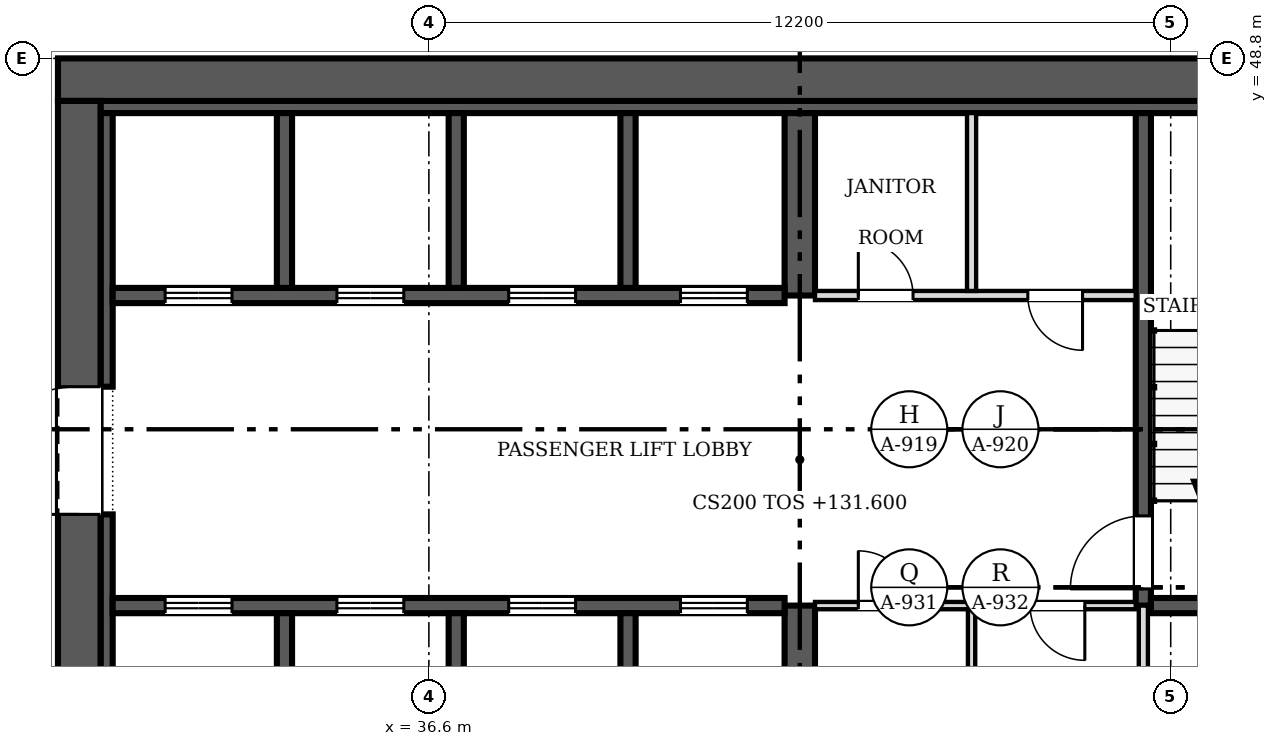
"""IFC4 building model, lengths in metres.
Left out: names, types, materials, properties, quantities, classifications, styles, units other than length and angle.
Written with IfcOpenShell. Run it as: python <this file> out.ifc"""

import sys

from ifc_helpers import new_model, si_unit, direction, frame, frame_2d, origin, place, context, subcontext, project, spatial, rectangle, extrude, source, transform, mapped, element, fill, save


model = new_model("IFC4")
c1 = context("Model", 3, precision=1e-05, world=origin(), true_north=direction((0.0, 1.0)))
c2 = subcontext(c1, "Body", "Model", "MODEL_VIEW")
j1 = project(units=[si_unit("LENGTHUNIT", "METRE"), si_unit("PLANEANGLEUNIT", "RADIAN")], contexts=[c1])
p1 = place(None, origin())
s1 = spatial("IfcSite", under=j1, at=p1, CompositionType="ELEMENT")
p2 = place(p1, origin())
s2 = spatial("IfcBuilding", under=s1, at=p2, CompositionType="ELEMENT")
p3 = place(p2, frame((0.0, 0.0, 131.6)))
s3 = spatial("IfcBuildingStorey", under=s2, at=p3, CompositionType="ELEMENT", Elevation=131.6)
p4 = place(p3, frame((30.85, 25.1, 0.0), z_axis=(0.0, 0.0, 1.0), x_axis=(0.0, 1.0, 0.0)))
e1 = element("IfcWall", 1, at=p4, inside=s3, PredefinedType="SHEAR", context=c2, shape_type="SweptSolid", body=[
    extrude(rectangle(XDim=23.0, YDim=0.7, at=frame_2d((11.5, 0.0))), origin(), (0.0, 0.0, 1.0), 3.8),
])
m1 = source(origin(), c2, "Body", "SweptSolid", [
    extrude(rectangle(XDim=2.1, YDim=2.4, at=frame_2d((1.05, 1.2))), frame((0.0, 0.36, 0.0), z_axis=(0.0, -1.0, 0.0), x_axis=(1.0, 0.0, 0.0)), (0.0, 0.0, 1.0), 0.72),
])
p5 = place(p4, frame((4.7, 0.0, 0.0)))
e2 = element("IfcOpeningElement", 2, at=p5, cuts=e1, PredefinedType="OPENING", context=c2, shape_type="MappedRepresentation", body=[
    mapped(m1, transform((0.0, 0.0, 0.0), scale=1.0)),
])
p6 = place(p4, frame((16.2, 0.0, 0.0)))
e3 = element("IfcOpeningElement", 3, at=p6, cuts=e1, PredefinedType="OPENING", context=c2, shape_type="MappedRepresentation", body=[
    mapped(m1, transform((0.0, 0.0, 0.0), scale=1.0)),
])
p7 = place(p3, frame((30.5, 48.45, 0.0), z_axis=(0.0, 0.0, 1.0), x_axis=(1.0, 0.0, 0.0)))
e4 = element("IfcWall", 4, at=p7, inside=s3, PredefinedType="SHEAR", context=c2, shape_type="SweptSolid", body=[
    extrude(rectangle(XDim=24.4, YDim=0.7, at=frame_2d((12.2, 0.0))), origin(), (0.0, 0.0, 1.0), 3.8),
])
p8 = place(p3, frame((31.2, 48.0, 0.0), z_axis=(0.0, 0.0, 1.0), x_axis=(1.0, 0.0, 0.0)))
e5 = element("IfcWall", 5, at=p8, inside=s3, PredefinedType="SOLIDWALL", context=c2, shape_type="SweptSolid", body=[
    extrude(rectangle(XDim=23.0, YDim=0.2, at=frame_2d((11.5, 0.0))), origin(), (0.0, 0.0, 1.0), 3.8),
])
p9 = place(p3, frame((31.3, 31.9, 0.0), z_axis=(0.0, 0.0, 1.0), x_axis=(0.0, 1.0, 0.0)))
e6 = element("IfcWall", 6, at=p9, inside=s3, PredefinedType="SOLIDWALL", context=c2, shape_type="SweptSolid", body=[
    extrude(rectangle(XDim=9.4, YDim=0.2, at=frame_2d((4.7, 0.0))), origin(), (0.0, 0.0, 1.0), 3.8),
])
p10 = place(p3, frame((31.3, 43.4, 0.0), z_axis=(0.0, 0.0, 1.0), x_axis=(0.0, 1.0, 0.0)))
e7 = element("IfcWall", 7, at=p10, inside=s3, PredefinedType="SOLIDWALL", context=c2, shape_type="SweptSolid", body=[
    extrude(rectangle(XDim=4.5, YDim=0.2, at=frame_2d((2.25, 0.0))), origin(), (0.0, 0.0, 1.0), 3.8),
])
p11 = place(p3, frame((42.7, 36.85, 0.0), z_axis=(0.0, 0.0, 1.0), x_axis=(0.0, 1.0, 0.0)))
e8 = element("IfcWall", 8, at=p11, inside=s3, PredefinedType="SHEAR", context=c2, shape_type="SweptSolid", body=[
    extrude(rectangle(XDim=2.95, YDim=0.5, at=frame_2d((1.475, 0.0))), origin(), (0.0, 0.0, 1.0), 3.8),
])
p12 = place(p3, frame((42.7, 44.9, 0.0), z_axis=(0.0, 0.0, 1.0), x_axis=(0.0, 1.0, 0.0)))
e9 = element("IfcWall", 9, at=p12, inside=s3, PredefinedType="SHEAR", context=c2, shape_type="SweptSolid", body=[
    extrude(rectangle(XDim=3.0, YDim=0.5, at=frame_2d((1.5, 0.0))), origin(), (0.0, 0.0, 1.0), 3.8),
])
p13 = place(p3, frame((31.4, 39.8, 0.0), z_axis=(0.0, 0.0, 1.0), x_axis=(1.0, 0.0, 0.0)))
e10 = element("IfcWall", 10, at=p13, inside=s3, PredefinedType="SOLIDWALL", context=c2, shape_type="SweptSolid", body=[
    extrude(rectangle(XDim=11.05, YDim=0.25, at=frame_2d((5.525, 0.0))), origin(), (0.0, 0.0, 1.0), 3.8),
])
m2 = source(origin(), c2, "Body", "SweptSolid", [
    extrude(rectangle(XDim=1.1, YDim=2.1, at=frame_2d((0.55, 1.05))), frame((0.0, 0.135, 0.0), z_axis=(0.0, -1.0, 0.0), x_axis=(1.0, 0.0, 0.0)), (0.0, 0.0, 1.0), 0.27),
])
p14 = place(p13, frame((0.863, 0.0, 0.0)))
e11 = element("IfcOpeningElement", 11, at=p14, cuts=e10, PredefinedType="OPENING", context=c2, shape_type="MappedRepresentation", body=[
    mapped(m2, transform((0.0, 0.0, 0.0), scale=1.0)),
])
p15 = place(p13, frame((3.688, 0.0, 0.0)))
e12 = element("IfcOpeningElement", 12, at=p15, cuts=e10, PredefinedType="OPENING", context=c2, shape_type="MappedRepresentation", body=[
    mapped(m2, transform((0.0, 0.0, 0.0), scale=1.0)),
])
p16 = place(p13, frame((6.512, 0.0, 0.0)))
e13 = element("IfcOpeningElement", 13, at=p16, cuts=e10, PredefinedType="OPENING", context=c2, shape_type="MappedRepresentation", body=[
    mapped(m2, transform((0.0, 0.0, 0.0), scale=1.0)),
])
p17 = place(p13, frame((9.337, 0.0, 0.0)))
e14 = element("IfcOpeningElement", 14, at=p17, cuts=e10, PredefinedType="OPENING", context=c2, shape_type="MappedRepresentation", body=[
    mapped(m2, transform((0.0, 0.0, 0.0), scale=1.0)),
])
p18 = place(p3, frame((42.45, 44.9, 0.0), z_axis=(0.0, 0.0, 1.0), x_axis=(-1.0, 0.0, 0.0)))
e15 = element("IfcWall", 15, at=p18, inside=s3, PredefinedType="SOLIDWALL", context=c2, shape_type="SweptSolid", body=[
    extrude(rectangle(XDim=11.05, YDim=0.25, at=frame_2d((5.525, 0.0))), origin(), (0.0, 0.0, 1.0), 3.8),
])
p19 = place(p18, frame((9.087, 0.0, 0.0)))
e16 = element("IfcOpeningElement", 16, at=p19, cuts=e15, PredefinedType="OPENING", context=c2, shape_type="MappedRepresentation", body=[
    mapped(m2, transform((0.0, 0.0, 0.0), scale=1.0)),
])
p20 = place(p18, frame((6.262, 0.0, 0.0)))
e17 = element("IfcOpeningElement", 17, at=p20, cuts=e15, PredefinedType="OPENING", context=c2, shape_type="MappedRepresentation", body=[
    mapped(m2, transform((0.0, 0.0, 0.0), scale=1.0)),
])
p21 = place(p18, frame((3.438, 0.0, 0.0)))
e18 = element("IfcOpeningElement", 18, at=p21, cuts=e15, PredefinedType="OPENING", context=c2, shape_type="MappedRepresentation", body=[
    mapped(m2, transform((0.0, 0.0, 0.0), scale=1.0)),
])
p22 = place(p18, frame((0.613, 0.0, 0.0)))
e19 = element("IfcOpeningElement", 19, at=p22, cuts=e15, PredefinedType="OPENING", context=c2, shape_type="MappedRepresentation", body=[
    mapped(m2, transform((0.0, 0.0, 0.0), scale=1.0)),
])
p23 = place(p3, frame((48.35, 47.9, 0.0), z_axis=(0.0, 0.0, 1.0), x_axis=(0.0, -1.0, 0.0)))
e20 = element("IfcWall", 20, at=p23, inside=s3, PredefinedType="SOLIDWALL", context=c2, shape_type="SweptSolid", body=[
    extrude(rectangle(XDim=8.1, YDim=0.25, at=frame_2d((4.05, 0.0))), origin(), (0.0, 0.0, 1.0), 3.8),
])
m3 = source(origin(), c2, "Body", "SweptSolid", [
    extrude(rectangle(XDim=1.2, YDim=2.1, at=frame_2d((0.6, 1.05))), frame((0.0, 0.135, 0.0), z_axis=(0.0, -1.0, 0.0), x_axis=(1.0, 0.0, 0.0)), (0.0, 0.0, 1.0), 0.27),
])
p24 = place(p23, frame((6.625, 0.0, 0.0)))
e21 = element("IfcOpeningElement", 21, at=p24, cuts=e20, PredefinedType="OPENING", context=c2, shape_type="MappedRepresentation", body=[
    mapped(m3, transform((0.0, 0.0, 0.0), scale=1.0)),
])
p25 = place(p3, frame((48.475, 39.8, 0.0), z_axis=(0.0, 0.0, 1.0), x_axis=(1.0, 0.0, 0.0)))
e22 = element("IfcWall", 22, at=p25, inside=s3, PredefinedType="SOLIDWALL", context=c2, shape_type="SweptSolid", body=[
    extrude(rectangle(XDim=3.4, YDim=0.25, at=frame_2d((1.7, 0.0))), origin(), (0.0, 0.0, 1.0), 3.8),
])
for number, where, z_axis, x_axis in (
    (23, (34.225, 36.85, 0.0), (0.0, 0.0, 1.0), (0.0, 1.0, 0.0)),
    (24, (37.05, 36.85, 0.0), (0.0, 0.0, 1.0), (0.0, 1.0, 0.0)),
    (25, (39.875, 36.85, 0.0), (0.0, 0.0, 1.0), (0.0, 1.0, 0.0)),
):
    element("IfcWall", number, at=place(p3, frame(where, z_axis=z_axis, x_axis=x_axis)), inside=s3, PredefinedType="SOLIDWALL", context=c2, shape_type="SweptSolid", body=[
        extrude(rectangle(XDim=2.825, YDim=0.25, at=frame_2d((1.413, 0.0))), origin(), (0.0, 0.0, 1.0), 3.8),
    ])
for number, where, z_axis, x_axis in (
    (26, (34.225, 45.025, 0.0), (0.0, 0.0, 1.0), (0.0, 1.0, 0.0)),
    (27, (37.05, 45.025, 0.0), (0.0, 0.0, 1.0), (0.0, 1.0, 0.0)),
    (28, (39.875, 45.025, 0.0), (0.0, 0.0, 1.0), (0.0, 1.0, 0.0)),
):
    element("IfcWall", number, at=place(p3, frame(where, z_axis=z_axis, x_axis=x_axis)), inside=s3, PredefinedType="SOLIDWALL", context=c2, shape_type="SweptSolid", body=[
        extrude(rectangle(XDim=2.875, YDim=0.25, at=frame_2d((1.438, 0.0))), origin(), (0.0, 0.0, 1.0), 3.8),
    ])
p26 = place(p3, frame((48.225, 39.8, 0.0), z_axis=(0.0, 0.0, 1.0), x_axis=(-1.0, 0.0, 0.0)))
e29 = element("IfcWall", 29, at=p26, inside=s3, PredefinedType="PARTITIONING", context=c2, shape_type="SweptSolid", body=[
    extrude(rectangle(XDim=5.275, YDim=0.12, at=frame_2d((2.638, 0.0))), origin(), (0.0, 0.0, 1.0), 3.6),
])
m4 = source(origin(), c2, "Body", "SweptSolid", [
    extrude(rectangle(XDim=0.9, YDim=2.1, at=frame_2d((0.45, 1.05))), frame((0.0, 0.07, 0.0), z_axis=(0.0, -1.0, 0.0), x_axis=(1.0, 0.0, 0.0)), (0.0, 0.0, 1.0), 0.14),
])
p27 = place(p26, frame((3.663, 0.0, 0.0)))
e30 = element("IfcOpeningElement", 30, at=p27, cuts=e29, PredefinedType="OPENING", context=c2, shape_type="MappedRepresentation", body=[
    mapped(m4, transform((0.0, 0.0, 0.0), scale=1.0)),
])
p28 = place(p26, frame((0.837, 0.0, 0.0)))
e31 = element("IfcOpeningElement", 31, at=p28, cuts=e29, PredefinedType="OPENING", context=c2, shape_type="MappedRepresentation", body=[
    mapped(m4, transform((0.0, 0.0, 0.0), scale=1.0)),
])
p29 = place(p3, frame((42.95, 44.9, 0.0), z_axis=(0.0, 0.0, 1.0), x_axis=(1.0, 0.0, 0.0)))
e32 = element("IfcWall", 32, at=p29, inside=s3, PredefinedType="PARTITIONING", context=c2, shape_type="SweptSolid", body=[
    extrude(rectangle(XDim=5.275, YDim=0.15, at=frame_2d((2.638, 0.0))), origin(), (0.0, 0.0, 1.0), 3.6),
])
m5 = source(origin(), c2, "Body", "SweptSolid", [
    extrude(rectangle(XDim=0.9, YDim=2.1, at=frame_2d((0.45, 1.05))), frame((0.0, 0.085, 0.0), z_axis=(0.0, -1.0, 0.0), x_axis=(1.0, 0.0, 0.0)), (0.0, 0.0, 1.0), 0.17),
])
p30 = place(p29, frame((0.712, 0.0, 0.0)))
e33 = element("IfcOpeningElement", 33, at=p30, cuts=e32, PredefinedType="OPENING", context=c2, shape_type="MappedRepresentation", body=[
    mapped(m5, transform((0.0, 0.0, 0.0), scale=1.0)),
])
p31 = place(p29, frame((3.5, 0.0, 0.0)))
e34 = element("IfcOpeningElement", 34, at=p31, cuts=e32, PredefinedType="OPENING", context=c2, shape_type="MappedRepresentation", body=[
    mapped(m5, transform((0.0, 0.0, 0.0), scale=1.0)),
])
p32 = place(p3, frame((45.525, 36.85, 0.0), z_axis=(0.0, 0.0, 1.0), x_axis=(0.0, 1.0, 0.0)))
e35 = element("IfcWall", 35, at=p32, inside=s3, PredefinedType="PARTITIONING", context=c2, shape_type="SweptSolid", body=[
    extrude(rectangle(XDim=2.89, YDim=0.12, at=frame_2d((1.445, 0.0))), origin(), (0.0, 0.0, 1.0), 3.6),
])
p33 = place(p3, frame((48.35, 36.85, 0.0), z_axis=(0.0, 0.0, 1.0), x_axis=(0.0, 1.0, 0.0)))
e36 = element("IfcWall", 36, at=p33, inside=s3, PredefinedType="PARTITIONING", context=c2, shape_type="SweptSolid", body=[
    extrude(rectangle(XDim=2.95, YDim=0.15, at=frame_2d((1.475, 0.0))), origin(), (0.0, 0.0, 1.0), 3.6),
])
p34 = place(p3, frame((45.525, 44.975, 0.0), z_axis=(0.0, 0.0, 1.0), x_axis=(0.0, 1.0, 0.0)))
e37 = element("IfcWall", 37, at=p34, inside=s3, PredefinedType="PARTITIONING", context=c2, shape_type="SweptSolid", body=[
    extrude(rectangle(XDim=2.925, YDim=0.15, at=frame_2d((1.462, 0.0))), origin(), (0.0, 0.0, 1.0), 3.6),
])
m6 = source(origin(), c2, "Body", "SweptSolid", [
    extrude(rectangle(XDim=2.1, YDim=2.4, at=frame_2d((1.05, 1.2))), frame((0.0, 0.025, 0.0), z_axis=(0.0, -1.0, 0.0), x_axis=(1.0, 0.0, 0.0)), (0.0, 0.0, 1.0), 0.05),
])
p35 = place(p6, origin())
e38 = element("IfcDoor", 38, at=p35, inside=s3, OperationType="DOUBLE_DOOR_SINGLE_SWING", PredefinedType="DOOR", context=c2, shape_type="MappedRepresentation", body=[
    mapped(m6, transform((0.0, 0.0, 0.0), scale=1.0)),
])
fill(e3, e38)
m7 = source(origin(), c2, "Body", "SweptSolid", [
    extrude(rectangle(XDim=1.1, YDim=2.1, at=frame_2d((0.55, 1.05))), frame((0.0, 0.025, 0.0), z_axis=(0.0, -1.0, 0.0), x_axis=(1.0, 0.0, 0.0)), (0.0, 0.0, 1.0), 0.05),
])
p36 = place(p14, origin())
e39 = element("IfcDoor", 39, at=p36, inside=s3, OperationType="DOUBLE_DOOR_SLIDING", PredefinedType="DOOR", context=c2, shape_type="MappedRepresentation", body=[
    mapped(m7, transform((0.0, 0.0, 0.0), scale=1.0)),
])
fill(e11, e39)
p37 = place(p15, origin())
e40 = element("IfcDoor", 40, at=p37, inside=s3, OperationType="DOUBLE_DOOR_SLIDING", PredefinedType="DOOR", context=c2, shape_type="MappedRepresentation", body=[
    mapped(m7, transform((0.0, 0.0, 0.0), scale=1.0)),
])
fill(e12, e40)
p38 = place(p16, origin())
e41 = element("IfcDoor", 41, at=p38, inside=s3, OperationType="DOUBLE_DOOR_SLIDING", PredefinedType="DOOR", context=c2, shape_type="MappedRepresentation", body=[
    mapped(m7, transform((0.0, 0.0, 0.0), scale=1.0)),
])
fill(e13, e41)
p39 = place(p17, origin())
e42 = element("IfcDoor", 42, at=p39, inside=s3, OperationType="DOUBLE_DOOR_SLIDING", PredefinedType="DOOR", context=c2, shape_type="MappedRepresentation", body=[
    mapped(m7, transform((0.0, 0.0, 0.0), scale=1.0)),
])
fill(e14, e42)
p40 = place(p19, origin())
e43 = element("IfcDoor", 43, at=p40, inside=s3, OperationType="DOUBLE_DOOR_SLIDING", PredefinedType="DOOR", context=c2, shape_type="MappedRepresentation", body=[
    mapped(m7, transform((0.0, 0.0, 0.0), scale=1.0)),
])
fill(e16, e43)
p41 = place(p20, origin())
e44 = element("IfcDoor", 44, at=p41, inside=s3, OperationType="DOUBLE_DOOR_SLIDING", PredefinedType="DOOR", context=c2, shape_type="MappedRepresentation", body=[
    mapped(m7, transform((0.0, 0.0, 0.0), scale=1.0)),
])
fill(e17, e44)
p42 = place(p21, origin())
e45 = element("IfcDoor", 45, at=p42, inside=s3, OperationType="DOUBLE_DOOR_SLIDING", PredefinedType="DOOR", context=c2, shape_type="MappedRepresentation", body=[
    mapped(m7, transform((0.0, 0.0, 0.0), scale=1.0)),
])
fill(e18, e45)
p43 = place(p22, origin())
e46 = element("IfcDoor", 46, at=p43, inside=s3, OperationType="DOUBLE_DOOR_SLIDING", PredefinedType="DOOR", context=c2, shape_type="MappedRepresentation", body=[
    mapped(m7, transform((0.0, 0.0, 0.0), scale=1.0)),
])
fill(e19, e46)
m8 = source(origin(), c2, "Body", "SweptSolid", [
    extrude(rectangle(XDim=1.2, YDim=2.1, at=frame_2d((0.6, 1.05))), frame((0.0, 0.025, 0.0), z_axis=(0.0, -1.0, 0.0), x_axis=(1.0, 0.0, 0.0)), (0.0, 0.0, 1.0), 0.05),
])
p44 = place(p24, origin())
e47 = element("IfcDoor", 47, at=p44, inside=s3, OperationType="SINGLE_SWING_RIGHT", PredefinedType="DOOR", context=c2, shape_type="MappedRepresentation", body=[
    mapped(m8, transform((0.0, 0.0, 0.0), scale=1.0)),
])
fill(e21, e47)
m9 = source(origin(), c2, "Body", "SweptSolid", [
    extrude(rectangle(XDim=0.9, YDim=2.1, at=frame_2d((0.45, 1.05))), frame((0.0, 0.025, 0.0), z_axis=(0.0, -1.0, 0.0), x_axis=(1.0, 0.0, 0.0)), (0.0, 0.0, 1.0), 0.05),
])
p45 = place(p27, origin())
e48 = element("IfcDoor", 48, at=p45, inside=s3, OperationType="SINGLE_SWING_RIGHT", PredefinedType="DOOR", context=c2, shape_type="MappedRepresentation", body=[
    mapped(m9, transform((0.0, 0.0, 0.0), scale=1.0)),
])
fill(e30, e48)
p46 = place(p28, origin())
e49 = element("IfcDoor", 49, at=p46, inside=s3, OperationType="SINGLE_SWING_LEFT", PredefinedType="DOOR", context=c2, shape_type="MappedRepresentation", body=[
    mapped(m9, transform((0.0, 0.0, 0.0), scale=1.0)),
])
fill(e31, e49)
p47 = place(p30, origin())
e50 = element("IfcDoor", 50, at=p47, inside=s3, OperationType="SINGLE_SWING_LEFT", PredefinedType="DOOR", context=c2, shape_type="MappedRepresentation", body=[
    mapped(m9, transform((0.0, 0.0, 0.0), scale=1.0)),
])
fill(e33, e50)
p48 = place(p31, origin())
e51 = element("IfcDoor", 51, at=p48, inside=s3, OperationType="SINGLE_SWING_RIGHT", PredefinedType="DOOR", context=c2, shape_type="MappedRepresentation", body=[
    mapped(m9, transform((0.0, 0.0, 0.0), scale=1.0)),
])
fill(e34, e51)
save(model, sys.argv[1])
